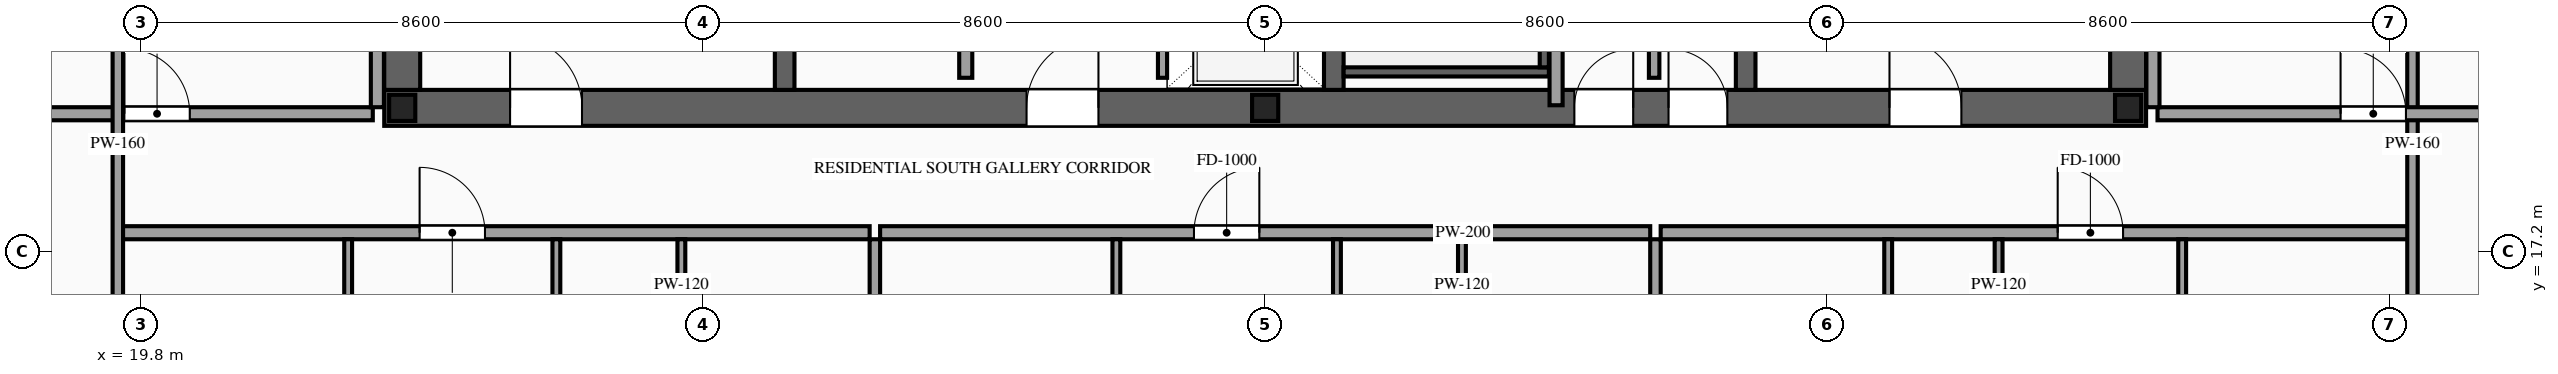
"""IFC4 building model, lengths in metres.
Left out: names, types, materials, properties, quantities, classifications, styles, units other than length and angle.
Written with IfcOpenShell. Run it as: python <this file> out.ifc"""

import sys

from ifc_helpers import new_model, si_unit, direction, frame, frame_2d, origin, origin_2d, place, context, subcontext, project, spatial, rectangle, i_section, extrude, source, transform, mapped, element, fill, save


model = new_model("IFC4")
c1 = context("Model", 3, precision=1e-05, world=origin(), true_north=direction((0.0, 1.0)))
c2 = subcontext(c1, "Body", "Model", "MODEL_VIEW")
j1 = project(units=[si_unit("LENGTHUNIT", "METRE"), si_unit("PLANEANGLEUNIT", "RADIAN")], contexts=[c1])
p1 = place(None, origin())
s1 = spatial("IfcSite", under=j1, at=p1, CompositionType="ELEMENT")
p2 = place(p1, origin())
s2 = spatial("IfcBuilding", under=s1, at=p2, CompositionType="ELEMENT")
p3 = place(p2, frame((0.0, 0.0, 252.1)))
s3 = spatial("IfcBuildingStorey", under=s2, at=p3, CompositionType="ELEMENT", Elevation=252.1)
p4 = place(p3, frame((23.525, 19.4, 0.0), z_axis=(0.0, 0.0, 1.0), x_axis=(1.0, 0.0, 0.0)))
e1 = element("IfcWall", 1, at=p4, inside=s3, PredefinedType="SHEAR", context=c2, shape_type="SweptSolid", body=[
    extrude(rectangle(XDim=26.95, YDim=0.55, at=frame_2d((13.475, 0.0))), origin(), (0.0, 0.0, 1.0), 3.5),
])
p5 = place(p4, frame((1.925, 0.0, 0.0)))
e2 = element("IfcOpeningElement", 2, at=p5, cuts=e1, PredefinedType="OPENING", context=c2, shape_type="SweptSolid", body=[
    extrude(rectangle(XDim=1.1, YDim=2.2, at=frame_2d((0.55, 1.1))), frame((0.0, 0.29, 0.0), z_axis=(0.0, -1.0, 0.0), x_axis=(1.0, 0.0, 0.0)), (0.0, 0.0, 1.0), 0.58),
])
p6 = place(p4, frame((9.825, 0.0, 0.0)))
e3 = element("IfcOpeningElement", 3, at=p6, cuts=e1, PredefinedType="OPENING", context=c2, shape_type="SweptSolid", body=[
    extrude(rectangle(XDim=1.1, YDim=2.2, at=frame_2d((0.55, 1.1))), frame((0.0, 0.29, 0.0), z_axis=(0.0, -1.0, 0.0), x_axis=(1.0, 0.0, 0.0)), (0.0, 0.0, 1.0), 0.58),
])
p7 = place(p4, frame((23.025, 0.0, 0.0)))
e4 = element("IfcOpeningElement", 4, at=p7, cuts=e1, PredefinedType="OPENING", context=c2, shape_type="SweptSolid", body=[
    extrude(rectangle(XDim=1.1, YDim=2.2, at=frame_2d((0.55, 1.1))), frame((0.0, 0.29, 0.0), z_axis=(0.0, -1.0, 0.0), x_axis=(1.0, 0.0, 0.0)), (0.0, 0.0, 1.0), 0.58),
])
p8 = place(p4, frame((19.645, 0.0, 0.0)))
e5 = element("IfcOpeningElement", 5, at=p8, cuts=e1, PredefinedType="OPENING", context=c2, shape_type="SweptSolid", body=[
    extrude(rectangle(XDim=0.9, YDim=2.15, at=frame_2d((0.45, 1.075))), frame((0.0, 0.29, 0.0), z_axis=(0.0, -1.0, 0.0), x_axis=(1.0, 0.0, 0.0)), (0.0, 0.0, 1.0), 0.58),
])
p9 = place(p4, frame((18.205, 0.0, 0.0)))
e6 = element("IfcOpeningElement", 6, at=p9, cuts=e1, PredefinedType="OPENING", context=c2, shape_type="SweptSolid", body=[
    extrude(rectangle(XDim=0.9, YDim=2.15, at=frame_2d((0.45, 1.075))), frame((0.0, 0.29, 0.0), z_axis=(0.0, -1.0, 0.0), x_axis=(1.0, 0.0, 0.0)), (0.0, 0.0, 1.0), 0.58),
])
m1 = source(origin(), c2, "Body", "SweptSolid", [
    extrude(rectangle(XDim=12.25, YDim=0.55, at=frame_2d((6.125, 0.0))), origin(), (0.0, 0.0, 1.0), 3.5),
])
for number, where, z_axis, x_axis in (
    (7, (23.8, 19.675, 0.0), (0.0, 0.0, 1.0), (0.0, 1.0, 0.0)),
    (8, (50.2, 19.675, 0.0), (0.0, 0.0, 1.0), (0.0, 1.0, 0.0)),
):
    element("IfcWall", number, at=place(p3, frame(where, z_axis=z_axis, x_axis=x_axis)), inside=s3, PredefinedType="SHEAR", context=c2, shape_type="MappedRepresentation", body=[
        mapped(m1, transform((0.0, 0.0, 0.0), scale=1.0)),
    ])
m2 = source(origin(), c2, "Body", "SweptSolid", [
    extrude(rectangle(XDim=12.25, YDim=0.3, at=frame_2d((6.125, 0.0))), origin(), (0.0, 0.0, 1.0), 3.5),
])
for number, where, z_axis, x_axis in (
    (9, (29.65, 19.675, 0.0), (0.0, 0.0, 1.0), (0.0, 1.0, 0.0)),
    (10, (38.05, 19.675, 0.0), (0.0, 0.0, 1.0), (0.0, 1.0, 0.0)),
    (11, (44.35, 19.675, 0.0), (0.0, 0.0, 1.0), (0.0, 1.0, 0.0)),
):
    element("IfcWall", number, at=place(p3, frame(where, z_axis=z_axis, x_axis=x_axis)), inside=s3, PredefinedType="SOLIDWALL", context=c2, shape_type="MappedRepresentation", body=[
        mapped(m2, transform((0.0, 0.0, 0.0), scale=1.0)),
    ])
m3 = source(origin(), c2, "Body", "SweptSolid", [
    extrude(i_section(OverallWidth=0.4, OverallDepth=0.4, WebThickness=0.013, FlangeThickness=0.021, at=origin_2d()), origin(), (0.0, 0.0, 1.0), 3.5),
])
for number, where, z_axis, x_axis in (
    (12, (23.8, 19.4, 0.0), (0.0, 0.0, 1.0), (1.0, 0.0, 0.0)),
    (13, (37.0, 19.4, 0.0), (0.0, 0.0, 1.0), (1.0, 0.0, 0.0)),
    (14, (50.2, 19.4, 0.0), (0.0, 0.0, 1.0), (1.0, 0.0, 0.0)),
):
    element("IfcColumn", number, at=place(p3, frame(where, z_axis=z_axis, x_axis=x_axis)), inside=s3, PredefinedType="COLUMN", context=c2, shape_type="MappedRepresentation", body=[
        mapped(m3, transform((0.0, 0.0, 0.0), scale=1.0)),
    ])
p10 = place(p3, frame((35.43, 19.86, 0.0), z_axis=(0.0, 0.0, 1.0), x_axis=(0.0, 1.0, 0.0)))
e15 = element("IfcWall", 15, at=p10, inside=s3, PredefinedType="SOLIDWALL", context=c2, shape_type="SweptSolid", body=[
    extrude(rectangle(XDim=2.04, YDim=0.14, at=frame_2d((1.02, 0.0))), origin(), (0.0, 0.0, 1.0), 3.28),
])
p11 = place(p10, frame((0.47, 0.0, 0.0)))
e16 = element("IfcOpeningElement", 16, at=p11, cuts=e15, PredefinedType="OPENING", context=c2, shape_type="SweptSolid", body=[
    extrude(rectangle(XDim=1.1, YDim=2.2, at=frame_2d((0.55, 1.1))), frame((0.0, 0.085, 0.0), z_axis=(0.0, -1.0, 0.0), x_axis=(1.0, 0.0, 0.0)), (0.0, 0.0, 1.0), 0.17),
])
m4 = source(origin(), c2, "Body", "SweptSolid", [
    extrude(rectangle(XDim=3.14, YDim=0.14, at=frame_2d((1.57, 0.0))), origin(), (0.0, 0.0, 1.0), 3.28),
])
p12 = place(p3, frame((38.2, 19.95, 0.0), z_axis=(0.0, 0.0, 1.0), x_axis=(1.0, 0.0, 0.0)))
e17 = element("IfcWall", 17, at=p12, inside=s3, PredefinedType="SOLIDWALL", context=c2, shape_type="MappedRepresentation", body=[
    mapped(m4, transform((0.0, 0.0, 0.0), scale=1.0)),
])
m5 = source(origin(), c2, "Body", "SweptSolid", [
    extrude(rectangle(XDim=8.94, YDim=0.14, at=frame_2d((4.47, 0.0))), origin(), (0.0, 0.0, 1.0), 3.28),
])
p13 = place(p3, frame((41.27, 20.02, 0.0), z_axis=(0.0, 0.0, 1.0), x_axis=(0.0, 1.0, 0.0)))
e18 = element("IfcWall", 18, at=p13, inside=s3, PredefinedType="SOLIDWALL", context=c2, shape_type="MappedRepresentation", body=[
    mapped(m5, transform((0.0, 0.0, 0.0), scale=1.0)),
])
p14 = place(p3, frame((32.42, 19.86, 0.0), z_axis=(0.0, 0.0, 1.0), x_axis=(0.0, 1.0, 0.0)))
e19 = element("IfcWall", 19, at=p14, inside=s3, PredefinedType="PARTITIONING", context=c2, shape_type="SweptSolid", body=[
    extrude(rectangle(XDim=11.88, YDim=0.2, at=frame_2d((5.94, 0.0))), origin(), (0.0, 0.0, 1.0), 3.28),
])
p15 = place(p14, frame((5.49, 0.0, 0.0)))
e20 = element("IfcOpeningElement", 20, at=p15, cuts=e19, PredefinedType="OPENING", context=c2, shape_type="SweptSolid", body=[
    extrude(rectangle(XDim=0.9, YDim=2.15, at=frame_2d((0.45, 1.075))), frame((0.0, 0.115, 0.0), z_axis=(0.0, -1.0, 0.0), x_axis=(1.0, 0.0, 0.0)), (0.0, 0.0, 1.0), 0.23),
])
m6 = source(origin(), c2, "Body", "SweptSolid", [
    extrude(rectangle(XDim=1.34, YDim=0.16, at=frame_2d((0.67, 0.0))), origin(), (0.0, 0.0, 1.0), 3.28),
])
p16 = place(p3, frame((42.95, 19.86, 0.0), z_axis=(0.0, 0.0, 1.0), x_axis=(0.0, 1.0, 0.0)))
e21 = element("IfcWall", 21, at=p16, inside=s3, PredefinedType="PARTITIONING", context=c2, shape_type="MappedRepresentation", body=[
    mapped(m6, transform((0.0, 0.0, 0.0), scale=1.0)),
])
m7 = source(origin(), c2, "Body", "SweptSolid", [
    extrude(rectangle(XDim=12.72, YDim=0.2, at=frame_2d((6.36, 0.0))), origin(), (0.0, 0.0, 1.0), 3.28),
])
p17 = place(p3, frame((41.45, 19.44, 0.0), z_axis=(0.0, 0.0, 1.0), x_axis=(0.0, 1.0, 0.0)))
e22 = element("IfcWall", 22, at=p17, inside=s3, PredefinedType="PARTITIONING", context=c2, shape_type="MappedRepresentation", body=[
    mapped(m7, transform((0.0, 0.0, 0.0), scale=1.0)),
])
p18 = place(p3, frame((19.44, 17.49, 0.0), z_axis=(0.0, 0.0, 1.0), x_axis=(1.0, 0.0, 0.0)))
e23 = element("IfcWall", 23, at=p18, inside=s3, PredefinedType="PARTITIONING", context=c2, shape_type="SweptSolid", body=[
    extrude(rectangle(XDim=11.51, YDim=0.2, at=frame_2d((5.755, 0.0))), origin(), (0.0, 0.0, 1.0), 3.28),
])
p19 = place(p18, frame((4.626, 0.0, 0.0)))
e24 = element("IfcOpeningElement", 24, at=p19, cuts=e23, PredefinedType="OPENING", context=c2, shape_type="SweptSolid", body=[
    extrude(rectangle(XDim=1.0, YDim=2.2, at=frame_2d((0.5, 1.1))), frame((0.0, 0.115, 0.0), z_axis=(0.0, -1.0, 0.0), x_axis=(1.0, 0.0, 0.0)), (0.0, 0.0, 1.0), 0.23),
])
m8 = source(origin(), c2, "Body", "SweptSolid", [
    extrude(rectangle(XDim=12.04, YDim=0.16, at=frame_2d((6.02, 0.0))), origin(), (0.0, 0.0, 1.0), 3.28),
])
p20 = place(p3, frame((31.03, 5.35, 0.0), z_axis=(0.0, 0.0, 1.0), x_axis=(0.0, 1.0, 0.0)))
e25 = element("IfcWall", 25, at=p20, inside=s3, PredefinedType="PARTITIONING", context=c2, shape_type="MappedRepresentation", body=[
    mapped(m8, transform((0.0, 0.0, 0.0), scale=1.0)),
])
m9 = source(origin(), c2, "Body", "SweptSolid", [
    extrude(rectangle(XDim=4.11, YDim=0.12, at=frame_2d((2.055, 0.0))), origin(), (0.0, 0.0, 1.0), 3.28),
])
p21 = place(p3, frame((22.973, 13.28, 0.0), z_axis=(0.0, 0.0, 1.0), x_axis=(0.0, 1.0, 0.0)))
e26 = element("IfcWall", 26, at=p21, inside=s3, PredefinedType="PARTITIONING", context=c2, shape_type="MappedRepresentation", body=[
    mapped(m9, transform((0.0, 0.0, 0.0), scale=1.0)),
])
p22 = place(p3, frame((28.07, 13.28, 0.0), z_axis=(0.0, 0.0, 1.0), x_axis=(0.0, 1.0, 0.0)))
e27 = element("IfcWall", 27, at=p22, inside=s3, PredefinedType="PARTITIONING", context=c2, shape_type="SweptSolid", body=[
    extrude(rectangle(XDim=4.11, YDim=0.12, at=frame_2d((2.055, 0.0))), origin(), (0.0, 0.0, 1.0), 3.28),
])
p23 = place(p22, frame((1.63, 0.0, 0.0)))
e28 = element("IfcOpeningElement", 28, at=p23, cuts=e27, PredefinedType="OPENING", context=c2, shape_type="SweptSolid", body=[
    extrude(rectangle(XDim=0.85, YDim=2.1, at=frame_2d((0.425, 1.05))), frame((0.0, 0.075, 0.0), z_axis=(0.0, -1.0, 0.0), x_axis=(1.0, 0.0, 0.0)), (0.0, 0.0, 1.0), 0.15),
])
p24 = place(p3, frame((26.158, 13.28, 0.0), z_axis=(0.0, 0.0, 1.0), x_axis=(0.0, 1.0, 0.0)))
e29 = element("IfcWall", 29, at=p24, inside=s3, PredefinedType="PARTITIONING", context=c2, shape_type="SweptSolid", body=[
    extrude(rectangle(XDim=4.11, YDim=0.12, at=frame_2d((2.055, 0.0))), origin(), (0.0, 0.0, 1.0), 3.28),
])
p25 = place(p24, frame((1.63, 0.0, 0.0)))
e30 = element("IfcOpeningElement", 30, at=p25, cuts=e29, PredefinedType="OPENING", context=c2, shape_type="SweptSolid", body=[
    extrude(rectangle(XDim=0.85, YDim=2.1, at=frame_2d((0.425, 1.05))), frame((0.0, 0.075, 0.0), z_axis=(0.0, -1.0, 0.0), x_axis=(1.0, 0.0, 0.0)), (0.0, 0.0, 1.0), 0.15),
])
p26 = place(p3, frame((31.11, 17.49, 0.0), z_axis=(0.0, 0.0, 1.0), x_axis=(1.0, 0.0, 0.0)))
e31 = element("IfcWall", 31, at=p26, inside=s3, PredefinedType="PARTITIONING", context=c2, shape_type="SweptSolid", body=[
    extrude(rectangle(XDim=11.78, YDim=0.2, at=frame_2d((5.89, 0.0))), origin(), (0.0, 0.0, 1.0), 3.28),
])
p27 = place(p26, frame((4.801, 0.0, 0.0)))
e32 = element("IfcOpeningElement", 32, at=p27, cuts=e31, PredefinedType="OPENING", context=c2, shape_type="SweptSolid", body=[
    extrude(rectangle(XDim=1.0, YDim=2.2, at=frame_2d((0.5, 1.1))), frame((0.0, 0.115, 0.0), z_axis=(0.0, -1.0, 0.0), x_axis=(1.0, 0.0, 0.0)), (0.0, 0.0, 1.0), 0.23),
])
p28 = place(p3, frame((42.97, 5.35, 0.0), z_axis=(0.0, 0.0, 1.0), x_axis=(0.0, 1.0, 0.0)))
e33 = element("IfcWall", 33, at=p28, inside=s3, PredefinedType="PARTITIONING", context=c2, shape_type="MappedRepresentation", body=[
    mapped(m8, transform((0.0, 0.0, 0.0), scale=1.0)),
])
p29 = place(p3, frame((34.724, 13.28, 0.0), z_axis=(0.0, 0.0, 1.0), x_axis=(0.0, 1.0, 0.0)))
e34 = element("IfcWall", 34, at=p29, inside=s3, PredefinedType="PARTITIONING", context=c2, shape_type="MappedRepresentation", body=[
    mapped(m9, transform((0.0, 0.0, 0.0), scale=1.0)),
])
p30 = place(p3, frame((40.01, 13.28, 0.0), z_axis=(0.0, 0.0, 1.0), x_axis=(0.0, 1.0, 0.0)))
e35 = element("IfcWall", 35, at=p30, inside=s3, PredefinedType="PARTITIONING", context=c2, shape_type="SweptSolid", body=[
    extrude(rectangle(XDim=4.11, YDim=0.12, at=frame_2d((2.055, 0.0))), origin(), (0.0, 0.0, 1.0), 3.28),
])
p31 = place(p30, frame((1.63, 0.0, 0.0)))
e36 = element("IfcOpeningElement", 36, at=p31, cuts=e35, PredefinedType="OPENING", context=c2, shape_type="SweptSolid", body=[
    extrude(rectangle(XDim=0.85, YDim=2.1, at=frame_2d((0.425, 1.05))), frame((0.0, 0.075, 0.0), z_axis=(0.0, -1.0, 0.0), x_axis=(1.0, 0.0, 0.0)), (0.0, 0.0, 1.0), 0.15),
])
p32 = place(p3, frame((38.098, 13.28, 0.0), z_axis=(0.0, 0.0, 1.0), x_axis=(0.0, 1.0, 0.0)))
e37 = element("IfcWall", 37, at=p32, inside=s3, PredefinedType="PARTITIONING", context=c2, shape_type="SweptSolid", body=[
    extrude(rectangle(XDim=4.11, YDim=0.12, at=frame_2d((2.055, 0.0))), origin(), (0.0, 0.0, 1.0), 3.28),
])
p33 = place(p32, frame((1.63, 0.0, 0.0)))
e38 = element("IfcOpeningElement", 38, at=p33, cuts=e37, PredefinedType="OPENING", context=c2, shape_type="SweptSolid", body=[
    extrude(rectangle(XDim=0.85, YDim=2.1, at=frame_2d((0.425, 1.05))), frame((0.0, 0.075, 0.0), z_axis=(0.0, -1.0, 0.0), x_axis=(1.0, 0.0, 0.0)), (0.0, 0.0, 1.0), 0.15),
])
p34 = place(p3, frame((43.05, 17.49, 0.0), z_axis=(0.0, 0.0, 1.0), x_axis=(1.0, 0.0, 0.0)))
e39 = element("IfcWall", 39, at=p34, inside=s3, PredefinedType="PARTITIONING", context=c2, shape_type="SweptSolid", body=[
    extrude(rectangle(XDim=11.51, YDim=0.2, at=frame_2d((5.755, 0.0))), origin(), (0.0, 0.0, 1.0), 3.28),
])
p35 = place(p34, frame((6.073, 0.0, 0.0)))
e40 = element("IfcOpeningElement", 40, at=p35, cuts=e39, PredefinedType="OPENING", context=c2, shape_type="SweptSolid", body=[
    extrude(rectangle(XDim=1.0, YDim=2.2, at=frame_2d((0.5, 1.1))), frame((0.0, 0.115, 0.0), z_axis=(0.0, -1.0, 0.0), x_axis=(1.0, 0.0, 0.0)), (0.0, 0.0, 1.0), 0.23),
])
p36 = place(p3, frame((46.53, 13.28, 0.0), z_axis=(0.0, 0.0, 1.0), x_axis=(0.0, 1.0, 0.0)))
e41 = element("IfcWall", 41, at=p36, inside=s3, PredefinedType="PARTITIONING", context=c2, shape_type="MappedRepresentation", body=[
    mapped(m9, transform((0.0, 0.0, 0.0), scale=1.0)),
])
p37 = place(p3, frame((48.219, 13.28, 0.0), z_axis=(0.0, 0.0, 1.0), x_axis=(0.0, 1.0, 0.0)))
e42 = element("IfcWall", 42, at=p37, inside=s3, PredefinedType="PARTITIONING", context=c2, shape_type="SweptSolid", body=[
    extrude(rectangle(XDim=4.11, YDim=0.12, at=frame_2d((2.055, 0.0))), origin(), (0.0, 0.0, 1.0), 3.28),
])
p38 = place(p37, frame((1.63, 0.0, 0.0)))
e43 = element("IfcOpeningElement", 43, at=p38, cuts=e42, PredefinedType="OPENING", context=c2, shape_type="SweptSolid", body=[
    extrude(rectangle(XDim=0.85, YDim=2.1, at=frame_2d((0.425, 1.05))), frame((0.0, 0.075, 0.0), z_axis=(0.0, -1.0, 0.0), x_axis=(1.0, 0.0, 0.0)), (0.0, 0.0, 1.0), 0.15),
])
p39 = place(p3, frame((51.027, 13.28, 0.0), z_axis=(0.0, 0.0, 1.0), x_axis=(0.0, 1.0, 0.0)))
e44 = element("IfcWall", 44, at=p39, inside=s3, PredefinedType="PARTITIONING", context=c2, shape_type="MappedRepresentation", body=[
    mapped(m9, transform((0.0, 0.0, 0.0), scale=1.0)),
])
p40 = place(p3, frame((16.55, 19.31, 0.0), z_axis=(0.0, 0.0, 1.0), x_axis=(1.0, 0.0, 0.0)))
e45 = element("IfcWall", 45, at=p40, inside=s3, PredefinedType="PARTITIONING", context=c2, shape_type="SweptSolid", body=[
    extrude(rectangle(XDim=6.8, YDim=0.2, at=frame_2d((3.4, 0.0))), origin(), (0.0, 0.0, 1.0), 2.825),
])
p41 = place(p40, frame((3.0, 0.0, 0.0)))
e46 = element("IfcOpeningElement", 46, at=p41, cuts=e45, PredefinedType="OPENING", context=c2, shape_type="SweptSolid", body=[
    extrude(rectangle(XDim=1.0, YDim=2.2, at=frame_2d((0.5, 1.1))), frame((0.0, 0.115, 0.0), z_axis=(0.0, -1.0, 0.0), x_axis=(1.0, 0.0, 0.0)), (0.0, 0.0, 1.0), 0.23),
])
m10 = source(origin(), c2, "Body", "SweptSolid", [
    extrude(rectangle(XDim=6.29, YDim=0.2, at=frame_2d((3.145, 0.0))), origin(), (0.0, 0.0, 1.0), 3.28),
])
p42 = place(p3, frame((23.42, 19.41, 0.0), z_axis=(0.0, 0.0, 1.0), x_axis=(0.0, 1.0, 0.0)))
e47 = element("IfcWall", 47, at=p42, inside=s3, PredefinedType="PARTITIONING", context=c2, shape_type="MappedRepresentation", body=[
    mapped(m10, transform((0.0, 0.0, 0.0), scale=1.0)),
])
m11 = source(origin(), c2, "Body", "SweptSolid", [
    extrude(rectangle(XDim=26.69, YDim=0.16, at=frame_2d((13.345, 0.0))), origin(), (0.0, 0.0, 1.0), 3.28),
])
for number, where, z_axis, x_axis in (
    (48, (19.45, 5.5, 0.0), (0.0, 0.0, 1.0), (0.0, 1.0, 0.0)),
    (49, (54.55, 5.5, 0.0), (0.0, 0.0, 1.0), (0.0, 1.0, 0.0)),
):
    element("IfcWall", number, at=place(p3, frame(where, z_axis=z_axis, x_axis=x_axis)), inside=s3, PredefinedType="PARTITIONING", context=c2, shape_type="MappedRepresentation", body=[
        mapped(m11, transform((0.0, 0.0, 0.0), scale=1.0)),
    ])
p43 = place(p3, frame((50.65, 19.31, 0.0), z_axis=(0.0, 0.0, 1.0), x_axis=(1.0, 0.0, 0.0)))
e50 = element("IfcWall", 50, at=p43, inside=s3, PredefinedType="PARTITIONING", context=c2, shape_type="SweptSolid", body=[
    extrude(rectangle(XDim=6.8, YDim=0.2, at=frame_2d((3.4, 0.0))), origin(), (0.0, 0.0, 1.0), 2.825),
])
p44 = place(p43, frame((2.8, 0.0, 0.0)))
e51 = element("IfcOpeningElement", 51, at=p44, cuts=e50, PredefinedType="OPENING", context=c2, shape_type="SweptSolid", body=[
    extrude(rectangle(XDim=1.0, YDim=2.2, at=frame_2d((0.5, 1.1))), frame((0.0, 0.115, 0.0), z_axis=(0.0, -1.0, 0.0), x_axis=(1.0, 0.0, 0.0)), (0.0, 0.0, 1.0), 0.23),
])
p45 = place(p3, frame((50.58, 19.41, 0.0), z_axis=(0.0, 0.0, 1.0), x_axis=(0.0, 1.0, 0.0)))
e52 = element("IfcWall", 52, at=p45, inside=s3, PredefinedType="PARTITIONING", context=c2, shape_type="MappedRepresentation", body=[
    mapped(m10, transform((0.0, 0.0, 0.0), scale=1.0)),
])
m12 = source(origin(), c2, "Body", "SweptSolid", [
    extrude(rectangle(XDim=1.1, YDim=2.2, at=frame_2d((0.55, 1.1))), frame((0.0, 0.025, 0.0), z_axis=(0.0, -1.0, 0.0), x_axis=(1.0, 0.0, 0.0)), (0.0, 0.0, 1.0), 0.05),
])
p46 = place(p5, origin())
e53 = element("IfcDoor", 53, at=p46, inside=s3, OperationType="SINGLE_SWING_LEFT", PredefinedType="DOOR", context=c2, shape_type="MappedRepresentation", body=[
    mapped(m12, transform((0.0, 0.0, 0.0), scale=1.0)),
])
fill(e2, e53)
p47 = place(p6, origin())
e54 = element("IfcDoor", 54, at=p47, inside=s3, OperationType="SINGLE_SWING_RIGHT", PredefinedType="DOOR", context=c2, shape_type="MappedRepresentation", body=[
    mapped(m12, transform((0.0, 0.0, 0.0), scale=1.0)),
])
fill(e3, e54)
p48 = place(p7, origin())
e55 = element("IfcDoor", 55, at=p48, inside=s3, OperationType="SINGLE_SWING_LEFT", PredefinedType="DOOR", context=c2, shape_type="MappedRepresentation", body=[
    mapped(m12, transform((0.0, 0.0, 0.0), scale=1.0)),
])
fill(e4, e55)
m13 = source(origin(), c2, "Body", "SweptSolid", [
    extrude(rectangle(XDim=0.9, YDim=2.15, at=frame_2d((0.45, 1.075))), frame((0.0, 0.025, 0.0), z_axis=(0.0, -1.0, 0.0), x_axis=(1.0, 0.0, 0.0)), (0.0, 0.0, 1.0), 0.05),
])
p49 = place(p8, origin())
e56 = element("IfcDoor", 56, at=p49, inside=s3, OperationType="SINGLE_SWING_LEFT", PredefinedType="DOOR", context=c2, shape_type="MappedRepresentation", body=[
    mapped(m13, transform((0.0, 0.0, 0.0), scale=1.0)),
])
fill(e5, e56)
p50 = place(p9, origin())
e57 = element("IfcDoor", 57, at=p50, inside=s3, OperationType="SINGLE_SWING_RIGHT", PredefinedType="DOOR", context=c2, shape_type="MappedRepresentation", body=[
    mapped(m13, transform((0.0, 0.0, 0.0), scale=1.0)),
])
fill(e6, e57)
m14 = source(origin(), c2, "Body", "SweptSolid", [
    extrude(rectangle(XDim=1.0, YDim=2.2, at=frame_2d((0.5, 1.1))), frame((0.0, 0.025, 0.0), z_axis=(0.0, -1.0, 0.0), x_axis=(1.0, 0.0, 0.0)), (0.0, 0.0, 1.0), 0.05),
])
p51 = place(p19, origin())
e58 = element("IfcDoor", 58, at=p51, inside=s3, OperationType="SINGLE_SWING_LEFT", PredefinedType="DOOR", context=c2, shape_type="MappedRepresentation", body=[
    mapped(m14, transform((0.0, 0.0, 0.0), scale=1.0)),
])
fill(e24, e58)
p52 = place(p27, origin())
e59 = element("IfcDoor", 59, at=p52, inside=s3, OperationType="SINGLE_SWING_RIGHT", PredefinedType="DOOR", context=c2, shape_type="MappedRepresentation", body=[
    mapped(m14, transform((0.0, 0.0, 0.0), scale=1.0)),
])
fill(e32, e59)
p53 = place(p35, origin())
e60 = element("IfcDoor", 60, at=p53, inside=s3, OperationType="SINGLE_SWING_LEFT", PredefinedType="DOOR", context=c2, shape_type="MappedRepresentation", body=[
    mapped(m14, transform((0.0, 0.0, 0.0), scale=1.0)),
])
fill(e40, e60)
p54 = place(p41, origin())
e61 = element("IfcDoor", 61, at=p54, inside=s3, OperationType="SINGLE_SWING_LEFT", PredefinedType="DOOR", context=c2, shape_type="MappedRepresentation", body=[
    mapped(m14, transform((0.0, 0.0, 0.0), scale=1.0)),
])
fill(e46, e61)
p55 = place(p44, origin())
e62 = element("IfcDoor", 62, at=p55, inside=s3, OperationType="SINGLE_SWING_LEFT", PredefinedType="DOOR", context=c2, shape_type="MappedRepresentation", body=[
    mapped(m14, transform((0.0, 0.0, 0.0), scale=1.0)),
])
fill(e51, e62)
save(model, sys.argv[1])
